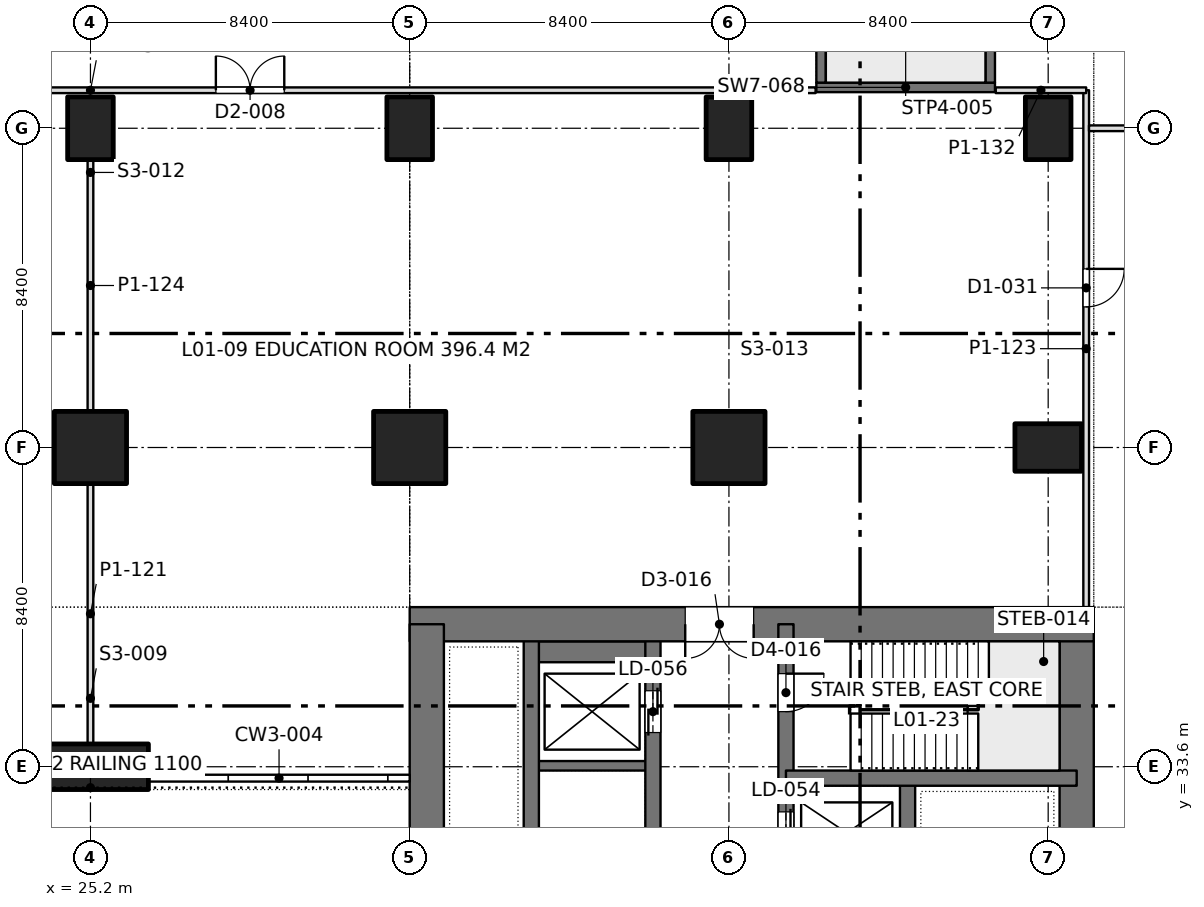
"""IFC4 building model, lengths in metres.
Left out: names, types, materials, properties, quantities, classifications, styles, units other than length and angle.
Written with IfcOpenShell. Run it as: python <this file> out.ifc"""

import sys

from ifc_helpers import new_model, si_unit, direction, frame, frame_2d, origin, origin_2d, place, context, subcontext, project, spatial, rectangle, extrude, element, fill, save


model = new_model("IFC4")
c1 = context("Model", 3, precision=1e-05, world=origin(), true_north=direction((0.0, 1.0)))
c2 = subcontext(c1, "Body", "Model", "MODEL_VIEW")
j1 = project(units=[si_unit("LENGTHUNIT", "METRE"), si_unit("PLANEANGLEUNIT", "RADIAN")], contexts=[c1])
p1 = place(None, origin())
s1 = spatial("IfcSite", under=j1, at=p1, CompositionType="ELEMENT")
p2 = place(p1, origin())
s2 = spatial("IfcBuilding", under=s1, at=p2, CompositionType="ELEMENT")
p3 = place(p2, frame((0.0, 0.0, 5.4)))
s3 = spatial("IfcBuildingStorey", under=s2, at=p3, CompositionType="ELEMENT", Elevation=5.4)
p4 = place(p3, frame((25.2, 42.0, 0.0), z_axis=(0.0, 0.0, 1.0), x_axis=(1.0, 0.0, 0.0)))
e1 = element("IfcColumn", 1, at=p4, inside=s3, PredefinedType="COLUMN", context=c2, shape_type="SweptSolid", body=[
    extrude(rectangle(XDim=1.9, YDim=1.9, at=origin_2d()), origin(), (0.0, 0.0, 1.0), 4.5),
])
p5 = place(p3, frame((25.2, 50.4, 0.0), z_axis=(0.0, 0.0, 1.0), x_axis=(1.0, 0.0, 0.0)))
e2 = element("IfcColumn", 2, at=p5, inside=s3, PredefinedType="COLUMN", context=c2, shape_type="SweptSolid", body=[
    extrude(rectangle(XDim=1.2, YDim=1.65, at=origin_2d()), origin(), (0.0, 0.0, 1.0), 4.5),
])
p6 = place(p3, frame((25.2, 33.6, 0.0), z_axis=(0.0, 0.0, 1.0), x_axis=(1.0, 0.0, 0.0)))
e3 = element("IfcColumn", 3, at=p6, inside=s3, PredefinedType="COLUMN", context=c2, shape_type="SweptSolid", body=[
    extrude(rectangle(XDim=3.05, YDim=1.2, at=origin_2d()), origin(), (0.0, 0.0, 1.0), 4.5),
])
p7 = place(p3, frame((33.6, 42.0, 0.0), z_axis=(0.0, 0.0, 1.0), x_axis=(1.0, 0.0, 0.0)))
e4 = element("IfcColumn", 4, at=p7, inside=s3, PredefinedType="COLUMN", context=c2, shape_type="SweptSolid", body=[
    extrude(rectangle(XDim=1.9, YDim=1.9, at=origin_2d()), origin(), (0.0, 0.0, 1.0), 4.5),
])
p8 = place(p3, frame((33.6, 50.4, 0.0), z_axis=(0.0, 0.0, 1.0), x_axis=(1.0, 0.0, 0.0)))
e5 = element("IfcColumn", 5, at=p8, inside=s3, PredefinedType="COLUMN", context=c2, shape_type="SweptSolid", body=[
    extrude(rectangle(XDim=1.2, YDim=1.65, at=origin_2d()), origin(), (0.0, 0.0, 1.0), 4.5),
])
p9 = place(p3, frame((42.0, 42.0, 0.0), z_axis=(0.0, 0.0, 1.0), x_axis=(1.0, 0.0, 0.0)))
e6 = element("IfcColumn", 6, at=p9, inside=s3, PredefinedType="COLUMN", context=c2, shape_type="SweptSolid", body=[
    extrude(rectangle(XDim=1.9, YDim=1.9, at=origin_2d()), origin(), (0.0, 0.0, 1.0), 4.5),
])
p10 = place(p3, frame((42.0, 50.4, 0.0), z_axis=(0.0, 0.0, 1.0), x_axis=(1.0, 0.0, 0.0)))
e7 = element("IfcColumn", 7, at=p10, inside=s3, PredefinedType="COLUMN", context=c2, shape_type="SweptSolid", body=[
    extrude(rectangle(XDim=1.2, YDim=1.65, at=origin_2d()), origin(), (0.0, 0.0, 1.0), 4.5),
])
p11 = place(p3, frame((50.4, 42.0, 0.0), z_axis=(0.0, 0.0, 1.0), x_axis=(0.0, 1.0, 0.0)))
e8 = element("IfcColumn", 8, at=p11, inside=s3, PredefinedType="COLUMN", context=c2, shape_type="SweptSolid", body=[
    extrude(rectangle(XDim=1.25, YDim=1.75, at=origin_2d()), origin(), (0.0, 0.0, 1.0), 4.5),
])
p12 = place(p3, frame((50.4, 50.4, 0.0), z_axis=(0.0, 0.0, 1.0), x_axis=(1.0, 0.0, 0.0)))
e9 = element("IfcColumn", 9, at=p12, inside=s3, PredefinedType="COLUMN", context=c2, shape_type="SweptSolid", body=[
    extrude(rectangle(XDim=1.2, YDim=1.65, at=origin_2d()), origin(), (0.0, 0.0, 1.0), 4.5),
])
p13 = place(p3, frame((33.6, 37.35, 0.0), z_axis=(0.0, 0.0, 1.0), x_axis=(1.0, 0.0, 0.0)))
e10 = element("IfcWall", 10, at=p13, inside=s3, PredefinedType="SHEAR", context=c2, shape_type="SweptSolid", body=[
    extrude(rectangle(XDim=18.0, YDim=0.9, at=frame_2d((9.0, 0.0))), origin(), (0.0, 0.0, 1.0), 4.5),
])
p14 = place(p13, frame((7.25, 0.0, 0.0)))
e11 = element("IfcOpeningElement", 11, at=p14, cuts=e10, PredefinedType="OPENING", context=c2, shape_type="SweptSolid", body=[
    extrude(rectangle(XDim=1.8, YDim=2.4, at=frame_2d((0.9, 1.2))), frame((0.0, 0.46, 0.0), z_axis=(0.0, -1.0, 0.0), x_axis=(1.0, 0.0, 0.0)), (0.0, 0.0, 1.0), 0.92),
])
for number, where, z_axis, x_axis in (
    (12, (34.05, 13.05, 0.0), (0.0, 0.0, 1.0), (0.0, 1.0, 0.0)),
    (13, (51.15, 13.05, 0.0), (0.0, 0.0, 1.0), (0.0, 1.0, 0.0)),
):
    element("IfcWall", number, at=place(p3, frame(where, z_axis=z_axis, x_axis=x_axis)), inside=s3, PredefinedType="SHEAR", context=c2, shape_type="SweptSolid", body=[
        extrude(rectangle(XDim=24.3, YDim=0.9, at=frame_2d((12.15, 0.0))), origin(), (0.0, 0.0, 1.0), 4.5),
    ])
p15 = place(p3, frame((43.5, 13.05, 0.0), z_axis=(0.0, 0.0, 1.0), x_axis=(0.0, 1.0, 0.0)))
e14 = element("IfcWall", 14, at=p15, inside=s3, PredefinedType="SHEAR", context=c2, shape_type="SweptSolid", body=[
    extrude(rectangle(XDim=24.3, YDim=0.4, at=frame_2d((12.15, 0.0))), origin(), (0.0, 0.0, 1.0), 4.5),
])
p16 = place(p15, frame((1.3, 0.0, 0.0)))
e15 = element("IfcOpeningElement", 15, at=p16, cuts=e14, PredefinedType="OPENING", context=c2, shape_type="SweptSolid", body=[
    extrude(rectangle(XDim=1.0, YDim=2.2, at=frame_2d((0.5, 1.1))), frame((0.0, 0.21, 0.0), z_axis=(0.0, -1.0, 0.0), x_axis=(1.0, 0.0, 0.0)), (0.0, 0.0, 1.0), 0.42),
])
p17 = place(p15, frame((22.0, 0.0, 0.0)))
e16 = element("IfcOpeningElement", 16, at=p17, cuts=e14, PredefinedType="OPENING", context=c2, shape_type="SweptSolid", body=[
    extrude(rectangle(XDim=1.0, YDim=2.2, at=frame_2d((0.5, 1.1))), frame((0.0, 0.21, 0.0), z_axis=(0.0, -1.0, 0.0), x_axis=(1.0, 0.0, 0.0)), (0.0, 0.0, 1.0), 0.42),
])
p18 = place(p15, frame((5.55, 0.0, 0.0)))
e17 = element("IfcOpeningElement", 17, at=p18, cuts=e14, PredefinedType="OPENING", context=c2, shape_type="SweptSolid", body=[
    extrude(rectangle(XDim=1.0, YDim=2.2, at=frame_2d((0.5, 1.1))), frame((0.0, 0.21, 0.0), z_axis=(0.0, -1.0, 0.0), x_axis=(1.0, 0.0, 0.0)), (0.0, 0.0, 1.0), 0.42),
])
p19 = place(p15, frame((9.55, 0.0, 0.0)))
e18 = element("IfcOpeningElement", 18, at=p19, cuts=e14, PredefinedType="OPENING", context=c2, shape_type="SweptSolid", body=[
    extrude(rectangle(XDim=1.0, YDim=2.2, at=frame_2d((0.5, 1.1))), frame((0.0, 0.21, 0.0), z_axis=(0.0, -1.0, 0.0), x_axis=(1.0, 0.0, 0.0)), (0.0, 0.0, 1.0), 0.42),
])
p20 = place(p15, frame((12.8, 0.0, 0.0)))
e19 = element("IfcOpeningElement", 19, at=p20, cuts=e14, PredefinedType="OPENING", context=c2, shape_type="SweptSolid", body=[
    extrude(rectangle(XDim=1.1, YDim=2.2, at=frame_2d((0.55, 1.1))), frame((0.0, 0.21, 0.0), z_axis=(0.0, -1.0, 0.0), x_axis=(1.0, 0.0, 0.0)), (0.0, 0.0, 1.0), 0.42),
])
p21 = place(p15, frame((15.538, 0.0, 0.0)))
e20 = element("IfcOpeningElement", 20, at=p21, cuts=e14, PredefinedType="OPENING", context=c2, shape_type="SweptSolid", body=[
    extrude(rectangle(XDim=1.1, YDim=2.2, at=frame_2d((0.55, 1.1))), frame((0.0, 0.21, 0.0), z_axis=(0.0, -1.0, 0.0), x_axis=(1.0, 0.0, 0.0)), (0.0, 0.0, 1.0), 0.42),
])
p22 = place(p15, frame((18.262, 0.0, 0.0)))
e21 = element("IfcOpeningElement", 21, at=p22, cuts=e14, PredefinedType="OPENING", context=c2, shape_type="SweptSolid", body=[
    extrude(rectangle(XDim=1.1, YDim=2.2, at=frame_2d((0.55, 1.1))), frame((0.0, 0.21, 0.0), z_axis=(0.0, -1.0, 0.0), x_axis=(1.0, 0.0, 0.0)), (0.0, 0.0, 1.0), 0.42),
])
p23 = place(p3, frame((40.0, 13.05, 0.0), z_axis=(0.0, 0.0, 1.0), x_axis=(0.0, 1.0, 0.0)))
e22 = element("IfcWall", 22, at=p23, inside=s3, PredefinedType="SHEAR", context=c2, shape_type="SweptSolid", body=[
    extrude(rectangle(XDim=24.3, YDim=0.4, at=frame_2d((12.15, 0.0))), origin(), (0.0, 0.0, 1.0), 4.5),
])
p24 = place(p23, frame((1.5, 0.0, 0.0)))
e23 = element("IfcOpeningElement", 23, at=p24, cuts=e22, PredefinedType="OPENING", context=c2, shape_type="SweptSolid", body=[
    extrude(rectangle(XDim=1.1, YDim=2.2, at=frame_2d((0.55, 1.1))), frame((0.0, 0.21, 0.0), z_axis=(0.0, -1.0, 0.0), x_axis=(1.0, 0.0, 0.0)), (0.0, 0.0, 1.0), 0.42),
])
p25 = place(p23, frame((4.35, 0.0, 0.0)))
e24 = element("IfcOpeningElement", 24, at=p25, cuts=e22, PredefinedType="OPENING", context=c2, shape_type="SweptSolid", body=[
    extrude(rectangle(XDim=1.1, YDim=2.2, at=frame_2d((0.55, 1.1))), frame((0.0, 0.21, 0.0), z_axis=(0.0, -1.0, 0.0), x_axis=(1.0, 0.0, 0.0)), (0.0, 0.0, 1.0), 0.42),
])
p26 = place(p23, frame((7.2, 0.0, 0.0)))
e25 = element("IfcOpeningElement", 25, at=p26, cuts=e22, PredefinedType="OPENING", context=c2, shape_type="SweptSolid", body=[
    extrude(rectangle(XDim=1.1, YDim=2.2, at=frame_2d((0.55, 1.1))), frame((0.0, 0.21, 0.0), z_axis=(0.0, -1.0, 0.0), x_axis=(1.0, 0.0, 0.0)), (0.0, 0.0, 1.0), 0.42),
])
p27 = place(p23, frame((21.45, 0.0, 0.0)))
e26 = element("IfcOpeningElement", 26, at=p27, cuts=e22, PredefinedType="OPENING", context=c2, shape_type="SweptSolid", body=[
    extrude(rectangle(XDim=1.1, YDim=2.2, at=frame_2d((0.55, 1.1))), frame((0.0, 0.21, 0.0), z_axis=(0.0, -1.0, 0.0), x_axis=(1.0, 0.0, 0.0)), (0.0, 0.0, 1.0), 0.42),
])
p28 = place(p3, frame((36.8, 13.05, 0.0), z_axis=(0.0, 0.0, 1.0), x_axis=(0.0, 1.0, 0.0)))
e27 = element("IfcWall", 27, at=p28, inside=s3, PredefinedType="SHEAR", context=c2, shape_type="SweptSolid", body=[
    extrude(rectangle(XDim=24.3, YDim=0.4, at=frame_2d((12.15, 0.0))), origin(), (0.0, 0.0, 1.0), 4.5),
])
p29 = place(p3, frame((51.15, 33.3, 0.0), z_axis=(0.0, 0.0, 1.0), x_axis=(-1.0, 0.0, 0.0)))
e28 = element("IfcWall", 28, at=p29, inside=s3, PredefinedType="SHEAR", context=c2, shape_type="SweptSolid", body=[
    extrude(rectangle(XDim=7.65, YDim=0.4, at=frame_2d((3.825, 0.0))), origin(), (0.0, 0.0, 1.0), 4.5),
])
p30 = place(p3, frame((46.7, 27.7, 0.0), z_axis=(0.0, 0.0, 1.0), x_axis=(0.0, 1.0, 0.0)))
e29 = element("IfcWall", 29, at=p30, inside=s3, PredefinedType="SHEAR", context=c2, shape_type="SweptSolid", body=[
    extrude(rectangle(XDim=5.6, YDim=0.4, at=frame_2d((2.8, 0.0))), origin(), (0.0, 0.0, 1.0), 4.5),
])
p31 = place(p3, frame((40.0, 33.625, 0.0), z_axis=(0.0, 0.0, 1.0), x_axis=(-1.0, 0.0, 0.0)))
e30 = element("IfcWall", 30, at=p31, inside=s3, PredefinedType="SHEAR", context=c2, shape_type="SweptSolid", body=[
    extrude(rectangle(XDim=3.2, YDim=0.25, at=frame_2d((1.6, 0.0))), origin(), (0.0, 0.0, 1.0), 4.5),
])
p32 = place(p3, frame((40.0, 36.625, 0.0), z_axis=(0.0, 0.0, 1.0), x_axis=(-1.0, 0.0, 0.0)))
e31 = element("IfcWall", 31, at=p32, inside=s3, PredefinedType="SHEAR", context=c2, shape_type="SweptSolid", body=[
    extrude(rectangle(XDim=3.2, YDim=0.55, at=frame_2d((1.6, 0.0))), origin(), (0.0, 0.0, 1.0), 4.5),
])
p33 = place(p3, frame((6.12, 51.4, 0.0), z_axis=(0.0, 0.0, 1.0), x_axis=(1.0, 0.0, 0.0)))
e32 = element("IfcWall", 32, at=p33, inside=s3, PredefinedType="PARTITIONING", context=c2, shape_type="SweptSolid", body=[
    extrude(rectangle(XDim=38.16, YDim=0.15, at=frame_2d((19.08, 0.0))), origin(), (0.0, 0.0, 1.0), 3.7),
])
p34 = place(p33, frame((13.98, 0.0, 0.0)))
e33 = element("IfcOpeningElement", 33, at=p34, cuts=e32, PredefinedType="OPENING", context=c2, shape_type="SweptSolid", body=[
    extrude(rectangle(XDim=1.8, YDim=2.2, at=frame_2d((0.9, 1.1))), frame((0.0, 0.085, 0.0), z_axis=(0.0, -1.0, 0.0), x_axis=(1.0, 0.0, 0.0)), (0.0, 0.0, 1.0), 0.17),
])
p35 = place(p33, frame((22.38, 0.0, 0.0)))
e34 = element("IfcOpeningElement", 34, at=p35, cuts=e32, PredefinedType="OPENING", context=c2, shape_type="SweptSolid", body=[
    extrude(rectangle(XDim=1.8, YDim=2.2, at=frame_2d((0.9, 1.1))), frame((0.0, 0.085, 0.0), z_axis=(0.0, -1.0, 0.0), x_axis=(1.0, 0.0, 0.0)), (0.0, 0.0, 1.0), 0.17),
])
p36 = place(p3, frame((49.02, 51.4, 0.0), z_axis=(0.0, 0.0, 1.0), x_axis=(1.0, 0.0, 0.0)))
e35 = element("IfcWall", 35, at=p36, inside=s3, PredefinedType="PARTITIONING", context=c2, shape_type="SweptSolid", body=[
    extrude(rectangle(XDim=2.38, YDim=0.15, at=frame_2d((1.19, 0.0))), origin(), (0.0, 0.0, 1.0), 3.7),
])
p37 = place(p3, frame((51.474, 50.4, 0.0), z_axis=(0.0, 0.0, 1.0), x_axis=(1.0, 0.0, 0.0)))
e36 = element("IfcWall", 36, at=p37, inside=s3, PredefinedType="PARTITIONING", context=c2, shape_type="SweptSolid", body=[
    extrude(rectangle(XDim=6.927, YDim=0.15, at=frame_2d((3.463, 0.0))), origin(), (0.0, 0.0, 1.0), 3.7),
])
p38 = place(p37, frame((3.426, 0.0, 0.0)))
e37 = element("IfcOpeningElement", 37, at=p38, cuts=e36, PredefinedType="OPENING", context=c2, shape_type="SweptSolid", body=[
    extrude(rectangle(XDim=1.0, YDim=2.2, at=frame_2d((0.5, 1.1))), frame((0.0, 0.085, 0.0), z_axis=(0.0, -1.0, 0.0), x_axis=(1.0, 0.0, 0.0)), (0.0, 0.0, 1.0), 0.17),
])
p39 = place(p3, frame((51.4, 37.8, 0.0), z_axis=(0.0, 0.0, 1.0), x_axis=(0.0, 1.0, 0.0)))
e38 = element("IfcWall", 38, at=p39, inside=s3, PredefinedType="PARTITIONING", context=c2, shape_type="SweptSolid", body=[
    extrude(rectangle(XDim=13.6, YDim=0.15, at=frame_2d((6.8, 0.0))), origin(), (0.0, 0.0, 1.0), 3.7),
])
p40 = place(p39, frame((7.9, 0.0, 0.0)))
e39 = element("IfcOpeningElement", 39, at=p40, cuts=e38, PredefinedType="OPENING", context=c2, shape_type="SweptSolid", body=[
    extrude(rectangle(XDim=1.0, YDim=2.2, at=frame_2d((0.5, 1.1))), frame((0.0, 0.085, 0.0), z_axis=(0.0, -1.0, 0.0), x_axis=(1.0, 0.0, 0.0)), (0.0, 0.0, 1.0), 0.17),
])
p41 = place(p3, frame((25.2, 34.199, 0.0), z_axis=(0.0, 0.0, 1.0), x_axis=(0.0, 1.0, 0.0)))
e40 = element("IfcWall", 40, at=p41, inside=s3, PredefinedType="PARTITIONING", context=c2, shape_type="SweptSolid", body=[
    extrude(rectangle(XDim=6.852, YDim=0.15, at=frame_2d((3.426, 0.0))), origin(), (0.0, 0.0, 1.0), 3.7),
])
p42 = place(p3, frame((25.2, 42.949, 0.0), z_axis=(0.0, 0.0, 1.0), x_axis=(0.0, 1.0, 0.0)))
e41 = element("IfcWall", 41, at=p42, inside=s3, PredefinedType="PARTITIONING", context=c2, shape_type="SweptSolid", body=[
    extrude(rectangle(XDim=6.627, YDim=0.15, at=frame_2d((3.313, 0.0))), origin(), (0.0, 0.0, 1.0), 3.7),
])
p43 = place(p3, frame((44.425, 59.702, 0.0), z_axis=(0.0, 0.0, 1.0), x_axis=(0.0, -1.0, 0.0)))
e42 = element("IfcWall", 42, at=p43, inside=s3, PredefinedType="SOLIDWALL", context=c2, shape_type="SweptSolid", body=[
    extrude(rectangle(XDim=8.102, YDim=0.25, at=frame_2d((4.051, 0.0))), origin(), (0.0, 0.0, 1.0), 4.5),
])
p44 = place(p43, frame((0.15, 0.0, 0.0)))
e43 = element("IfcOpeningElement", 43, at=p44, cuts=e42, PredefinedType="OPENING", context=c2, shape_type="SweptSolid", body=[
    extrude(rectangle(XDim=2.0, YDim=2.2, at=frame_2d((1.0, 1.1))), frame((0.0, 0.135, 0.0), z_axis=(0.0, -1.0, 0.0), x_axis=(1.0, 0.0, 0.0)), (0.0, 0.0, 1.0), 0.27),
])
p45 = place(p3, frame((48.875, 59.702, 0.0), z_axis=(0.0, 0.0, 1.0), x_axis=(0.0, -1.0, 0.0)))
e44 = element("IfcWall", 44, at=p45, inside=s3, PredefinedType="SOLIDWALL", context=c2, shape_type="SweptSolid", body=[
    extrude(rectangle(XDim=8.102, YDim=0.25, at=frame_2d((4.051, 0.0))), origin(), (0.0, 0.0, 1.0), 4.5),
])
p46 = place(p3, frame((44.3, 51.475, 0.0), z_axis=(0.0, 0.0, 1.0), x_axis=(1.0, 0.0, 0.0)))
e45 = element("IfcWall", 45, at=p46, inside=s3, PredefinedType="SOLIDWALL", context=c2, shape_type="SweptSolid", body=[
    extrude(rectangle(XDim=4.7, YDim=0.25, at=frame_2d((2.35, 0.0))), origin(), (0.0, 0.0, 1.0), 4.5),
])
p47 = place(p14, frame((1.8, 0.0, 0.0), z_axis=(0.0, 0.0, 1.0), x_axis=(-1.0, 0.0, 0.0)))
e46 = element("IfcDoor", 46, at=p47, inside=s3, OperationType="DOUBLE_DOOR_SINGLE_SWING", PredefinedType="DOOR", context=c2, shape_type="SweptSolid", body=[
    extrude(rectangle(XDim=1.8, YDim=2.4, at=frame_2d((0.9, 1.2))), frame((0.0, 0.025, 0.0), z_axis=(0.0, -1.0, 0.0), x_axis=(1.0, 0.0, 0.0)), (0.0, 0.0, 1.0), 0.05),
])
fill(e11, e46)
p48 = place(p17, frame((1.0, 0.0, 0.0), z_axis=(0.0, 0.0, 1.0), x_axis=(-1.0, 0.0, 0.0)))
e47 = element("IfcDoor", 47, at=p48, inside=s3, OperationType="SINGLE_SWING_LEFT", PredefinedType="DOOR", context=c2, shape_type="SweptSolid", body=[
    extrude(rectangle(XDim=1.0, YDim=2.2, at=frame_2d((0.5, 1.1))), frame((0.0, 0.025, 0.0), z_axis=(0.0, -1.0, 0.0), x_axis=(1.0, 0.0, 0.0)), (0.0, 0.0, 1.0), 0.05),
])
fill(e16, e47)
p49 = place(p27, origin())
e48 = element("IfcDoor", 48, at=p49, inside=s3, OperationType="DOUBLE_DOOR_SLIDING", PredefinedType="DOOR", context=c2, shape_type="SweptSolid", body=[
    extrude(rectangle(XDim=1.1, YDim=2.2, at=frame_2d((0.55, 1.1))), frame((0.0, 0.025, 0.0), z_axis=(0.0, -1.0, 0.0), x_axis=(1.0, 0.0, 0.0)), (0.0, 0.0, 1.0), 0.05),
])
fill(e26, e48)
p50 = place(p22, origin())
e49 = element("IfcDoor", 49, at=p50, inside=s3, OperationType="DOUBLE_DOOR_SLIDING", PredefinedType="DOOR", context=c2, shape_type="SweptSolid", body=[
    extrude(rectangle(XDim=1.1, YDim=2.2, at=frame_2d((0.55, 1.1))), frame((0.0, 0.025, 0.0), z_axis=(0.0, -1.0, 0.0), x_axis=(1.0, 0.0, 0.0)), (0.0, 0.0, 1.0), 0.05),
])
fill(e21, e49)
p51 = place(p35, origin())
e50 = element("IfcDoor", 50, at=p51, inside=s3, OperationType="DOUBLE_DOOR_SINGLE_SWING", PredefinedType="DOOR", context=c2, shape_type="SweptSolid", body=[
    extrude(rectangle(XDim=1.8, YDim=2.2, at=frame_2d((0.9, 1.1))), frame((0.0, 0.025, 0.0), z_axis=(0.0, -1.0, 0.0), x_axis=(1.0, 0.0, 0.0)), (0.0, 0.0, 1.0), 0.05),
])
fill(e34, e50)
p52 = place(p40, frame((1.0, 0.0, 0.0), z_axis=(0.0, 0.0, 1.0), x_axis=(-1.0, 0.0, 0.0)))
e51 = element("IfcDoor", 51, at=p52, inside=s3, OperationType="SINGLE_SWING_LEFT", PredefinedType="DOOR", context=c2, shape_type="SweptSolid", body=[
    extrude(rectangle(XDim=1.0, YDim=2.2, at=frame_2d((0.5, 1.1))), frame((0.0, 0.025, 0.0), z_axis=(0.0, -1.0, 0.0), x_axis=(1.0, 0.0, 0.0)), (0.0, 0.0, 1.0), 0.05),
])
fill(e39, e51)
save(model, sys.argv[1])
